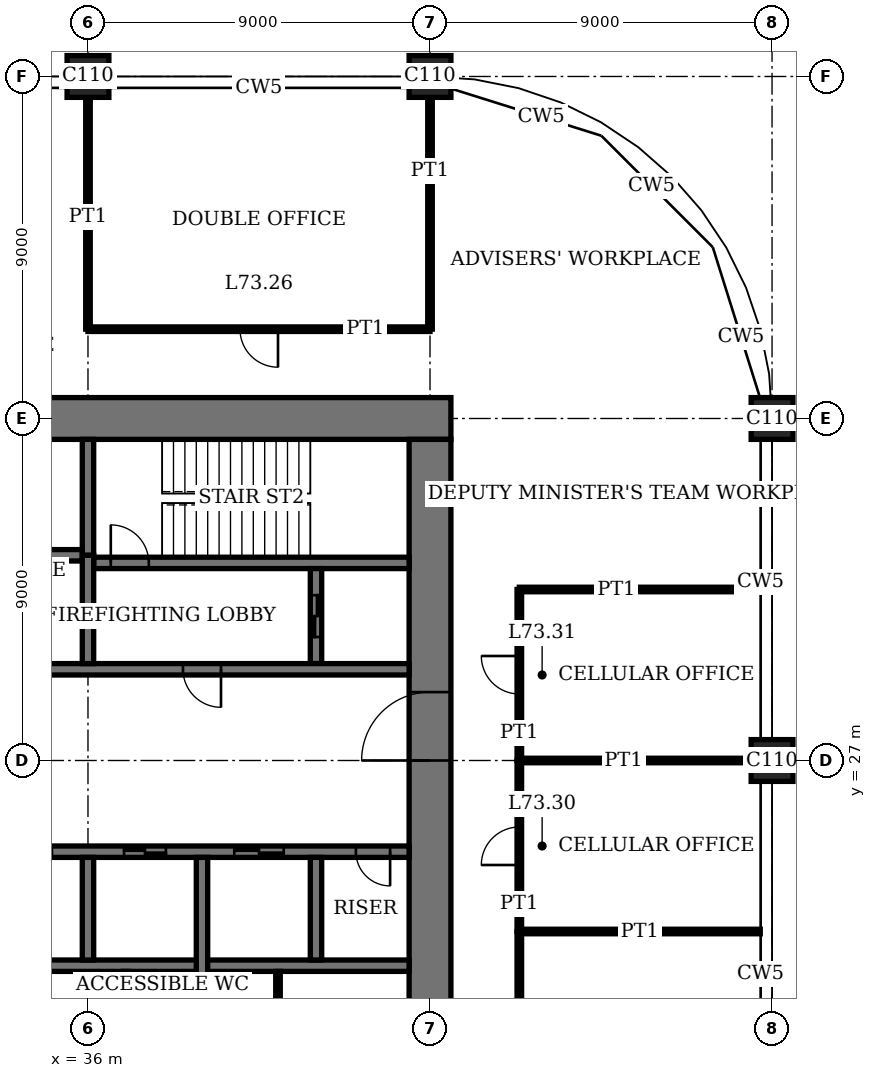
"""IFC4 building model, lengths in metres.
Left out: names, types, materials, properties, quantities, classifications, styles, units other than length and angle.
Written with IfcOpenShell. Run it as: python <this file> out.ifc"""

import sys

from ifc_helpers import new_model, si_unit, direction, frame, frame_2d, origin, origin_2d, place, context, subcontext, project, spatial, rectangle, extrude, element, fill, save


model = new_model("IFC4")
c1 = context("Model", 3, precision=1e-05, world=origin(), true_north=direction((0.0, 1.0)))
c2 = subcontext(c1, "Body", "Model", "MODEL_VIEW")
j1 = project(units=[si_unit("LENGTHUNIT", "METRE"), si_unit("PLANEANGLEUNIT", "RADIAN")], contexts=[c1])
p1 = place(None, origin())
s1 = spatial("IfcSite", under=j1, at=p1, CompositionType="ELEMENT")
p2 = place(p1, origin())
s2 = spatial("IfcBuilding", under=s1, at=p2, CompositionType="ELEMENT")
p3 = place(p2, frame((0.0, 0.0, 299.4)))
s3 = spatial("IfcBuildingStorey", under=s2, at=p3, CompositionType="ELEMENT", Elevation=299.4)
for number, where, z_axis, x_axis in (
    (1, (36.0, 45.0, 0.0), (0.0, 0.0, 1.0), (1.0, 0.0, 0.0)),
    (2, (45.0, 45.0, 0.0), (0.0, 0.0, 1.0), (1.0, 0.0, 0.0)),
    (3, (54.0, 27.0, 0.0), (0.0, 0.0, 1.0), (1.0, 0.0, 0.0)),
    (4, (54.0, 36.0, 0.0), (0.0, 0.0, 1.0), (1.0, 0.0, 0.0)),
):
    element("IfcColumn", number, at=place(p3, frame(where, z_axis=z_axis, x_axis=x_axis)), inside=s3, PredefinedType="COLUMN", context=c2, shape_type="SweptSolid", body=[
        extrude(rectangle(XDim=1.1, YDim=1.1, at=origin_2d()), origin(), (0.0, 0.0, 1.0), 4.0),
    ])
p4 = place(p3, frame((45.55, 36.0, 0.0), z_axis=(0.0, 0.0, 1.0), x_axis=(-1.0, 0.0, 0.0)))
e5 = element("IfcWall", 5, at=p4, inside=s3, PredefinedType="SHEAR", context=c2, shape_type="SweptSolid", body=[
    extrude(rectangle(XDim=28.1, YDim=1.1, at=frame_2d((14.05, 0.0))), origin(), (0.0, 0.0, 1.0), 4.0),
])
p5 = place(p4, frame((11.55, 0.0, 0.0)))
e6 = element("IfcOpeningElement", 6, at=p5, cuts=e5, PredefinedType="OPENING", context=c2, shape_type="SweptSolid", body=[
    extrude(rectangle(XDim=1.0, YDim=2.4, at=frame_2d((0.5, 1.2))), frame((0.0, 0.56, 0.0), z_axis=(0.0, -1.0, 0.0), x_axis=(1.0, 0.0, 0.0)), (0.0, 0.0, 1.0), 1.12),
])
p6 = place(p4, frame((16.55, 0.0, 0.0)))
e7 = element("IfcOpeningElement", 7, at=p6, cuts=e5, PredefinedType="OPENING", context=c2, shape_type="SweptSolid", body=[
    extrude(rectangle(XDim=1.0, YDim=2.4, at=frame_2d((0.5, 1.2))), frame((0.0, 0.56, 0.0), z_axis=(0.0, -1.0, 0.0), x_axis=(1.0, 0.0, 0.0)), (0.0, 0.0, 1.0), 1.12),
])
p7 = place(p4, frame((20.0, 0.0, 0.0)))
e8 = element("IfcOpeningElement", 8, at=p7, cuts=e5, PredefinedType="OPENING", context=c2, shape_type="SweptSolid", body=[
    extrude(rectangle(XDim=1.1, YDim=2.4, at=frame_2d((0.55, 1.2))), frame((0.0, 0.56, 0.0), z_axis=(0.0, -1.0, 0.0), x_axis=(1.0, 0.0, 0.0)), (0.0, 0.0, 1.0), 1.12),
])
p8 = place(p4, frame((24.05, 0.0, 0.0)))
e9 = element("IfcOpeningElement", 9, at=p8, cuts=e5, PredefinedType="OPENING", context=c2, shape_type="SweptSolid", body=[
    extrude(rectangle(XDim=1.0, YDim=2.4, at=frame_2d((0.5, 1.2))), frame((0.0, 0.56, 0.0), z_axis=(0.0, -1.0, 0.0), x_axis=(1.0, 0.0, 0.0)), (0.0, 0.0, 1.0), 1.12),
])
p9 = place(p3, frame((45.0, 18.55, 0.0), z_axis=(0.0, 0.0, 1.0), x_axis=(0.0, 1.0, 0.0)))
e10 = element("IfcWall", 10, at=p9, inside=s3, PredefinedType="SHEAR", context=c2, shape_type="SweptSolid", body=[
    extrude(rectangle(XDim=16.9, YDim=1.1, at=frame_2d((8.45, 0.0))), origin(), (0.0, 0.0, 1.0), 4.0),
])
p10 = place(p9, frame((8.45, 0.0, 0.0)))
e11 = element("IfcOpeningElement", 11, at=p10, cuts=e10, PredefinedType="OPENING", context=c2, shape_type="SweptSolid", body=[
    extrude(rectangle(XDim=1.8, YDim=2.4, at=frame_2d((0.9, 1.2))), frame((0.0, 0.56, 0.0), z_axis=(0.0, -1.0, 0.0), x_axis=(1.0, 0.0, 0.0)), (0.0, 0.0, 1.0), 1.12),
])
p11 = place(p3, frame((36.15, 32.2, 0.0), z_axis=(0.0, 0.0, 1.0), x_axis=(1.0, 0.0, 0.0)))
e12 = element("IfcWall", 12, at=p11, inside=s3, PredefinedType="SHEAR", context=c2, shape_type="SweptSolid", body=[
    extrude(rectangle(XDim=8.3, YDim=0.3, at=frame_2d((4.15, 0.0))), origin(), (0.0, 0.0, 1.0), 4.0),
])
p12 = place(p11, frame((0.45, 0.0, 0.0)))
e13 = element("IfcOpeningElement", 13, at=p12, cuts=e12, PredefinedType="OPENING", context=c2, shape_type="SweptSolid", body=[
    extrude(rectangle(XDim=1.0, YDim=2.4, at=frame_2d((0.5, 1.2))), frame((0.0, 0.16, 0.0), z_axis=(0.0, -1.0, 0.0), x_axis=(1.0, 0.0, 0.0)), (0.0, 0.0, 1.0), 0.32),
])
p13 = place(p3, frame((36.0, 32.4, 0.0), z_axis=(0.0, 0.0, 1.0), x_axis=(0.0, 1.0, 0.0)))
e14 = element("IfcWall", 14, at=p13, inside=s3, PredefinedType="SHEAR", context=c2, shape_type="SweptSolid", body=[
    extrude(rectangle(XDim=3.05, YDim=0.3, at=frame_2d((1.525, 0.0))), origin(), (0.0, 0.0, 1.0), 4.0),
])
p14 = place(p3, frame((42.0, 29.55, 0.0), z_axis=(0.0, 0.0, 1.0), x_axis=(0.0, 1.0, 0.0)))
e15 = element("IfcWall", 15, at=p14, inside=s3, PredefinedType="SHEAR", context=c2, shape_type="SweptSolid", body=[
    extrude(rectangle(XDim=2.5, YDim=0.3, at=frame_2d((1.25, 0.0))), origin(), (0.0, 0.0, 1.0), 4.0),
])
p15 = place(p14, frame((0.7, 0.0, 0.0)))
e16 = element("IfcOpeningElement", 16, at=p15, cuts=e15, PredefinedType="OPENING", context=c2, shape_type="SweptSolid", body=[
    extrude(rectangle(XDim=1.1, YDim=2.4, at=frame_2d((0.55, 1.2))), frame((0.0, 0.16, 0.0), z_axis=(0.0, -1.0, 0.0), x_axis=(1.0, 0.0, 0.0)), (0.0, 0.0, 1.0), 0.32),
])
p16 = place(p3, frame((18.55, 24.6, 0.0), z_axis=(0.0, 0.0, 1.0), x_axis=(1.0, 0.0, 0.0)))
e17 = element("IfcWall", 17, at=p16, inside=s3, PredefinedType="SHEAR", context=c2, shape_type="SweptSolid", body=[
    extrude(rectangle(XDim=25.9, YDim=0.3, at=frame_2d((12.95, 0.0))), origin(), (0.0, 0.0, 1.0), 4.0),
])
p17 = place(p16, frame((4.95, 0.0, 0.0)))
e18 = element("IfcOpeningElement", 18, at=p17, cuts=e17, PredefinedType="OPENING", context=c2, shape_type="SweptSolid", body=[
    extrude(rectangle(XDim=1.0, YDim=2.4, at=frame_2d((0.5, 1.2))), frame((0.0, 0.16, 0.0), z_axis=(0.0, -1.0, 0.0), x_axis=(1.0, 0.0, 0.0)), (0.0, 0.0, 1.0), 0.32),
])
p18 = place(p16, frame((24.5, 0.0, 0.0)))
e19 = element("IfcOpeningElement", 19, at=p18, cuts=e17, PredefinedType="OPENING", context=c2, shape_type="SweptSolid", body=[
    extrude(rectangle(XDim=0.9, YDim=2.1, at=frame_2d((0.45, 1.05))), frame((0.0, 0.16, 0.0), z_axis=(0.0, -1.0, 0.0), x_axis=(1.0, 0.0, 0.0)), (0.0, 0.0, 1.0), 0.32),
])
p19 = place(p16, frame((9.4, 0.0, 0.0)))
e20 = element("IfcOpeningElement", 20, at=p19, cuts=e17, PredefinedType="OPENING", context=c2, shape_type="SweptSolid", body=[
    extrude(rectangle(XDim=1.1, YDim=2.4, at=frame_2d((0.55, 1.2))), frame((0.0, 0.16, 0.0), z_axis=(0.0, -1.0, 0.0), x_axis=(1.0, 0.0, 0.0)), (0.0, 0.0, 1.0), 0.32),
])
p20 = place(p16, frame((12.4, 0.0, 0.0)))
e21 = element("IfcOpeningElement", 21, at=p20, cuts=e17, PredefinedType="OPENING", context=c2, shape_type="SweptSolid", body=[
    extrude(rectangle(XDim=1.1, YDim=2.4, at=frame_2d((0.55, 1.2))), frame((0.0, 0.16, 0.0), z_axis=(0.0, -1.0, 0.0), x_axis=(1.0, 0.0, 0.0)), (0.0, 0.0, 1.0), 0.32),
])
p21 = place(p16, frame((15.4, 0.0, 0.0)))
e22 = element("IfcOpeningElement", 22, at=p21, cuts=e17, PredefinedType="OPENING", context=c2, shape_type="SweptSolid", body=[
    extrude(rectangle(XDim=1.1, YDim=2.4, at=frame_2d((0.55, 1.2))), frame((0.0, 0.16, 0.0), z_axis=(0.0, -1.0, 0.0), x_axis=(1.0, 0.0, 0.0)), (0.0, 0.0, 1.0), 0.32),
])
p22 = place(p16, frame((18.4, 0.0, 0.0)))
e23 = element("IfcOpeningElement", 23, at=p22, cuts=e17, PredefinedType="OPENING", context=c2, shape_type="SweptSolid", body=[
    extrude(rectangle(XDim=1.1, YDim=2.4, at=frame_2d((0.55, 1.2))), frame((0.0, 0.16, 0.0), z_axis=(0.0, -1.0, 0.0), x_axis=(1.0, 0.0, 0.0)), (0.0, 0.0, 1.0), 0.32),
])
p23 = place(p16, frame((21.3, 0.0, 0.0)))
e24 = element("IfcOpeningElement", 24, at=p23, cuts=e17, PredefinedType="OPENING", context=c2, shape_type="SweptSolid", body=[
    extrude(rectangle(XDim=1.3, YDim=2.4, at=frame_2d((0.65, 1.2))), frame((0.0, 0.16, 0.0), z_axis=(0.0, -1.0, 0.0), x_axis=(1.0, 0.0, 0.0)), (0.0, 0.0, 1.0), 0.32),
])
p24 = place(p3, frame((18.55, 29.4, 0.0), z_axis=(0.0, 0.0, 1.0), x_axis=(1.0, 0.0, 0.0)))
e25 = element("IfcWall", 25, at=p24, inside=s3, PredefinedType="SHEAR", context=c2, shape_type="SweptSolid", body=[
    extrude(rectangle(XDim=25.9, YDim=0.3, at=frame_2d((12.95, 0.0))), origin(), (0.0, 0.0, 1.0), 4.0),
])
p25 = place(p24, frame((19.95, 0.0, 0.0)))
e26 = element("IfcOpeningElement", 26, at=p25, cuts=e25, PredefinedType="OPENING", context=c2, shape_type="SweptSolid", body=[
    extrude(rectangle(XDim=1.0, YDim=2.4, at=frame_2d((0.5, 1.2))), frame((0.0, 0.16, 0.0), z_axis=(0.0, -1.0, 0.0), x_axis=(1.0, 0.0, 0.0)), (0.0, 0.0, 1.0), 0.32),
])
p26 = place(p24, frame((0.5, 0.0, 0.0)))
e27 = element("IfcOpeningElement", 27, at=p26, cuts=e25, PredefinedType="OPENING", context=c2, shape_type="SweptSolid", body=[
    extrude(rectangle(XDim=0.9, YDim=2.1, at=frame_2d((0.45, 1.05))), frame((0.0, 0.16, 0.0), z_axis=(0.0, -1.0, 0.0), x_axis=(1.0, 0.0, 0.0)), (0.0, 0.0, 1.0), 0.32),
])
p27 = place(p24, frame((15.45, 0.0, 0.0)))
e28 = element("IfcOpeningElement", 28, at=p27, cuts=e25, PredefinedType="OPENING", context=c2, shape_type="SweptSolid", body=[
    extrude(rectangle(XDim=1.0, YDim=2.4, at=frame_2d((0.5, 1.2))), frame((0.0, 0.16, 0.0), z_axis=(0.0, -1.0, 0.0), x_axis=(1.0, 0.0, 0.0)), (0.0, 0.0, 1.0), 0.32),
])
p28 = place(p24, frame((12.45, 0.0, 0.0)))
e29 = element("IfcOpeningElement", 29, at=p28, cuts=e25, PredefinedType="OPENING", context=c2, shape_type="SweptSolid", body=[
    extrude(rectangle(XDim=1.0, YDim=2.4, at=frame_2d((0.5, 1.2))), frame((0.0, 0.16, 0.0), z_axis=(0.0, -1.0, 0.0), x_axis=(1.0, 0.0, 0.0)), (0.0, 0.0, 1.0), 0.32),
])
p29 = place(p24, frame((9.45, 0.0, 0.0)))
e30 = element("IfcOpeningElement", 30, at=p29, cuts=e25, PredefinedType="OPENING", context=c2, shape_type="SweptSolid", body=[
    extrude(rectangle(XDim=1.0, YDim=2.4, at=frame_2d((0.5, 1.2))), frame((0.0, 0.16, 0.0), z_axis=(0.0, -1.0, 0.0), x_axis=(1.0, 0.0, 0.0)), (0.0, 0.0, 1.0), 0.32),
])
p30 = place(p24, frame((6.45, 0.0, 0.0)))
e31 = element("IfcOpeningElement", 31, at=p30, cuts=e25, PredefinedType="OPENING", context=c2, shape_type="SweptSolid", body=[
    extrude(rectangle(XDim=1.0, YDim=2.4, at=frame_2d((0.5, 1.2))), frame((0.0, 0.16, 0.0), z_axis=(0.0, -1.0, 0.0), x_axis=(1.0, 0.0, 0.0)), (0.0, 0.0, 1.0), 0.32),
])
p31 = place(p24, frame((3.3, 0.0, 0.0)))
e32 = element("IfcOpeningElement", 32, at=p31, cuts=e25, PredefinedType="OPENING", context=c2, shape_type="SweptSolid", body=[
    extrude(rectangle(XDim=1.3, YDim=2.4, at=frame_2d((0.65, 1.2))), frame((0.0, 0.16, 0.0), z_axis=(0.0, -1.0, 0.0), x_axis=(1.0, 0.0, 0.0)), (0.0, 0.0, 1.0), 0.32),
])
for number, where, z_axis, x_axis in (
    (33, (27.15, 21.6, 0.0), (0.0, 0.0, 1.0), (1.0, 0.0, 0.0)),
    (34, (18.55, 32.4, 0.0), (0.0, 0.0, 1.0), (1.0, 0.0, 0.0)),
):
    element("IfcWall", number, at=place(p3, frame(where, z_axis=z_axis, x_axis=x_axis)), inside=s3, PredefinedType="SHEAR", context=c2, shape_type="SweptSolid", body=[
        extrude(rectangle(XDim=17.3, YDim=0.3, at=frame_2d((8.65, 0.0))), origin(), (0.0, 0.0, 1.0), 4.0),
    ])
p32 = place(p3, frame((36.0, 21.75, 0.0), z_axis=(0.0, 0.0, 1.0), x_axis=(0.0, 1.0, 0.0)))
e35 = element("IfcWall", 35, at=p32, inside=s3, PredefinedType="SHEAR", context=c2, shape_type="SweptSolid", body=[
    extrude(rectangle(XDim=2.7, YDim=0.3, at=frame_2d((1.35, 0.0))), origin(), (0.0, 0.0, 1.0), 4.0),
])
p33 = place(p3, frame((39.0, 18.55, 0.0), z_axis=(0.0, 0.0, 1.0), x_axis=(0.0, 1.0, 0.0)))
e36 = element("IfcWall", 36, at=p33, inside=s3, PredefinedType="SHEAR", context=c2, shape_type="SweptSolid", body=[
    extrude(rectangle(XDim=5.9, YDim=0.3, at=frame_2d((2.95, 0.0))), origin(), (0.0, 0.0, 1.0), 4.0),
])
p34 = place(p3, frame((42.0, 21.75, 0.0), z_axis=(0.0, 0.0, 1.0), x_axis=(0.0, 1.0, 0.0)))
e37 = element("IfcWall", 37, at=p34, inside=s3, PredefinedType="SHEAR", context=c2, shape_type="SweptSolid", body=[
    extrude(rectangle(XDim=2.7, YDim=0.3, at=frame_2d((1.35, 0.0))), origin(), (0.0, 0.0, 1.0), 4.0),
])
p35 = place(p3, frame((36.0, 29.55, 0.0), z_axis=(0.0, 0.0, 1.0), x_axis=(0.0, 1.0, 0.0)))
e38 = element("IfcWall", 38, at=p35, inside=s3, PredefinedType="SHEAR", context=c2, shape_type="SweptSolid", body=[
    extrude(rectangle(XDim=2.85, YDim=0.3, at=frame_2d((1.425, 0.0))), origin(), (0.0, 0.0, 1.0), 4.0),
])
p36 = place(p3, frame((47.35, 22.5, 0.0), z_axis=(0.0, 0.0, 1.0), x_axis=(1.0, 0.0, 0.0)))
e39 = element("IfcWall", 39, at=p36, inside=s3, PredefinedType="PARTITIONING", context=c2, shape_type="SweptSolid", body=[
    extrude(rectangle(XDim=6.34, YDim=0.12, at=frame_2d((3.17, 0.0))), origin(), (0.0, 0.0, 1.0), 3.1),
])
p37 = place(p3, frame((47.35, 27.0, 0.0), z_axis=(0.0, 0.0, 1.0), x_axis=(1.0, 0.0, 0.0)))
e40 = element("IfcWall", 40, at=p37, inside=s3, PredefinedType="PARTITIONING", context=c2, shape_type="SweptSolid", body=[
    extrude(rectangle(XDim=6.1, YDim=0.12, at=frame_2d((3.05, 0.0))), origin(), (0.0, 0.0, 1.0), 3.05),
])
p38 = place(p3, frame((47.35, 31.5, 0.0), z_axis=(0.0, 0.0, 1.0), x_axis=(1.0, 0.0, 0.0)))
e41 = element("IfcWall", 41, at=p38, inside=s3, PredefinedType="PARTITIONING", context=c2, shape_type="SweptSolid", body=[
    extrude(rectangle(XDim=6.34, YDim=0.12, at=frame_2d((3.17, 0.0))), origin(), (0.0, 0.0, 1.0), 3.1),
])
p39 = place(p3, frame((36.0, 38.35, 0.0), z_axis=(0.0, 0.0, 1.0), x_axis=(1.0, 0.0, 0.0)))
e42 = element("IfcWall", 42, at=p39, inside=s3, PredefinedType="PARTITIONING", context=c2, shape_type="SweptSolid", body=[
    extrude(rectangle(XDim=9.0, YDim=0.12, at=frame_2d((4.5, 0.0))), origin(), (0.0, 0.0, 1.0), 3.75),
])
p40 = place(p39, frame((4.0, 0.0, 0.0)))
e43 = element("IfcOpeningElement", 43, at=p40, cuts=e42, PredefinedType="OPENING", context=c2, shape_type="SweptSolid", body=[
    extrude(rectangle(XDim=1.0, YDim=2.4, at=frame_2d((0.5, 1.2))), frame((0.0, 0.07, 0.0), z_axis=(0.0, -1.0, 0.0), x_axis=(1.0, 0.0, 0.0)), (0.0, 0.0, 1.0), 0.14),
])
for number, where, z_axis, x_axis in (
    (44, (36.0, 38.35, 0.0), (0.0, 0.0, 1.0), (0.0, 1.0, 0.0)),
    (45, (45.0, 38.35, 0.0), (0.0, 0.0, 1.0), (0.0, 1.0, 0.0)),
):
    element("IfcWall", number, at=place(p3, frame(where, z_axis=z_axis, x_axis=x_axis)), inside=s3, PredefinedType="PARTITIONING", context=c2, shape_type="SweptSolid", body=[
        extrude(rectangle(XDim=6.1, YDim=0.12, at=frame_2d((3.05, 0.0))), origin(), (0.0, 0.0, 1.0), 3.05),
    ])
p41 = place(p3, frame((47.35, 13.5, 0.0), z_axis=(0.0, 0.0, 1.0), x_axis=(0.0, 1.0, 0.0)))
e46 = element("IfcWall", 46, at=p41, inside=s3, PredefinedType="PARTITIONING", context=c2, shape_type="SweptSolid", body=[
    extrude(rectangle(XDim=9.0, YDim=0.12, at=frame_2d((4.5, 0.0))), origin(), (0.0, 0.0, 1.0), 3.75),
])
p42 = place(p3, frame((47.35, 22.5, 0.0), z_axis=(0.0, 0.0, 1.0), x_axis=(0.0, 1.0, 0.0)))
e47 = element("IfcWall", 47, at=p42, inside=s3, PredefinedType="PARTITIONING", context=c2, shape_type="SweptSolid", body=[
    extrude(rectangle(XDim=4.5, YDim=0.12, at=frame_2d((2.25, 0.0))), origin(), (0.0, 0.0, 1.0), 3.75),
])
p43 = place(p42, frame((1.75, 0.0, 0.0)))
e48 = element("IfcOpeningElement", 48, at=p43, cuts=e47, PredefinedType="OPENING", context=c2, shape_type="SweptSolid", body=[
    extrude(rectangle(XDim=1.0, YDim=2.4, at=frame_2d((0.5, 1.2))), frame((0.0, 0.07, 0.0), z_axis=(0.0, -1.0, 0.0), x_axis=(1.0, 0.0, 0.0)), (0.0, 0.0, 1.0), 0.14),
])
p44 = place(p3, frame((47.35, 27.0, 0.0), z_axis=(0.0, 0.0, 1.0), x_axis=(0.0, 1.0, 0.0)))
e49 = element("IfcWall", 49, at=p44, inside=s3, PredefinedType="PARTITIONING", context=c2, shape_type="SweptSolid", body=[
    extrude(rectangle(XDim=4.5, YDim=0.12, at=frame_2d((2.25, 0.0))), origin(), (0.0, 0.0, 1.0), 3.75),
])
p45 = place(p44, frame((1.75, 0.0, 0.0)))
e50 = element("IfcOpeningElement", 50, at=p45, cuts=e49, PredefinedType="OPENING", context=c2, shape_type="SweptSolid", body=[
    extrude(rectangle(XDim=1.0, YDim=2.4, at=frame_2d((0.5, 1.2))), frame((0.0, 0.07, 0.0), z_axis=(0.0, -1.0, 0.0), x_axis=(1.0, 0.0, 0.0)), (0.0, 0.0, 1.0), 0.14),
])
p46 = place(p3, frame((37.0, 18.55, 0.0), z_axis=(0.0, 0.0, 1.0), x_axis=(0.0, 1.0, 0.0)))
e51 = element("IfcWall", 51, at=p46, inside=s3, PredefinedType="PARTITIONING", context=c2, shape_type="SweptSolid", body=[
    extrude(rectangle(XDim=2.9, YDim=0.15, at=frame_2d((1.45, 0.0))), origin(), (0.0, 0.0, 1.0), 3.75),
])
p47 = place(p3, frame((41.0, 18.55, 0.0), z_axis=(0.0, 0.0, 1.0), x_axis=(0.0, 1.0, 0.0)))
e52 = element("IfcWall", 52, at=p47, inside=s3, PredefinedType="PARTITIONING", context=c2, shape_type="SweptSolid", body=[
    extrude(rectangle(XDim=2.9, YDim=0.12, at=frame_2d((1.45, 0.0))), origin(), (0.0, 0.0, 1.0), 3.75),
])
p48 = place(p47, frame((0.95, 0.0, 0.0)))
e53 = element("IfcOpeningElement", 53, at=p48, cuts=e52, PredefinedType="OPENING", context=c2, shape_type="SweptSolid", body=[
    extrude(rectangle(XDim=1.0, YDim=2.4, at=frame_2d((0.5, 1.2))), frame((0.0, 0.07, 0.0), z_axis=(0.0, -1.0, 0.0), x_axis=(1.0, 0.0, 0.0)), (0.0, 0.0, 1.0), 0.14),
])
p49 = place(p10, origin())
e54 = element("IfcDoor", 54, at=p49, inside=s3, OperationType="DOUBLE_DOOR_DOUBLE_SWING", PredefinedType="DOOR", context=c2, shape_type="SweptSolid", body=[
    extrude(rectangle(XDim=1.8, YDim=2.4, at=frame_2d((0.9, 1.2))), frame((0.0, 0.03, 0.0), z_axis=(0.0, -1.0, 0.0), x_axis=(1.0, 0.0, 0.0)), (0.0, 0.0, 1.0), 0.06),
    extrude(rectangle(XDim=0.04, YDim=2.4, at=frame_2d((0.02, 1.2))), frame((0.0, 0.55, 0.0), z_axis=(0.0, -1.0, 0.0), x_axis=(1.0, 0.0, 0.0)), (0.0, 0.0, 1.0), 1.1),
    extrude(rectangle(XDim=0.04, YDim=2.4, at=frame_2d((1.78, 1.2))), frame((0.0, 0.55, 0.0), z_axis=(0.0, -1.0, 0.0), x_axis=(1.0, 0.0, 0.0)), (0.0, 0.0, 1.0), 1.1),
    extrude(rectangle(XDim=1.8, YDim=0.04, at=frame_2d((0.9, 2.38))), frame((0.0, 0.55, 0.0), z_axis=(0.0, -1.0, 0.0), x_axis=(1.0, 0.0, 0.0)), (0.0, 0.0, 1.0), 1.1),
])
fill(e11, e54)
p50 = place(p12, origin())
e55 = element("IfcDoor", 55, at=p50, inside=s3, OperationType="SINGLE_SWING_RIGHT", PredefinedType="DOOR", context=c2, shape_type="SweptSolid", body=[
    extrude(rectangle(XDim=1.0, YDim=2.4, at=frame_2d((0.5, 1.2))), frame((0.0, 0.03, 0.0), z_axis=(0.0, -1.0, 0.0), x_axis=(1.0, 0.0, 0.0)), (0.0, 0.0, 1.0), 0.06),
])
fill(e13, e55)
p51 = place(p25, origin())
e56 = element("IfcDoor", 56, at=p51, inside=s3, OperationType="SINGLE_SWING_RIGHT", PredefinedType="DOOR", context=c2, shape_type="SweptSolid", body=[
    extrude(rectangle(XDim=1.0, YDim=2.4, at=frame_2d((0.5, 1.2))), frame((0.0, 0.03, 0.0), z_axis=(0.0, -1.0, 0.0), x_axis=(1.0, 0.0, 0.0)), (0.0, 0.0, 1.0), 0.06),
])
fill(e26, e56)
p52 = place(p18, origin())
e57 = element("IfcDoor", 57, at=p52, inside=s3, OperationType="SINGLE_SWING_RIGHT", PredefinedType="DOOR", context=c2, shape_type="SweptSolid", body=[
    extrude(rectangle(XDim=0.9, YDim=2.1, at=frame_2d((0.45, 1.05))), frame((0.0, 0.03, 0.0), z_axis=(0.0, -1.0, 0.0), x_axis=(1.0, 0.0, 0.0)), (0.0, 0.0, 1.0), 0.06),
])
fill(e19, e57)
p53 = place(p40, origin())
e58 = element("IfcDoor", 58, at=p53, inside=s3, OperationType="SINGLE_SWING_RIGHT", PredefinedType="DOOR", context=c2, shape_type="SweptSolid", body=[
    extrude(rectangle(XDim=1.0, YDim=2.4, at=frame_2d((0.5, 1.2))), frame((0.0, 0.025, 0.0), z_axis=(0.0, -1.0, 0.0), x_axis=(1.0, 0.0, 0.0)), (0.0, 0.0, 1.0), 0.05),
])
fill(e43, e58)
p54 = place(p43, origin())
e59 = element("IfcDoor", 59, at=p54, inside=s3, OperationType="SINGLE_SWING_RIGHT", PredefinedType="DOOR", context=c2, shape_type="SweptSolid", body=[
    extrude(rectangle(XDim=1.0, YDim=2.4, at=frame_2d((0.5, 1.2))), frame((0.0, 0.025, 0.0), z_axis=(0.0, -1.0, 0.0), x_axis=(1.0, 0.0, 0.0)), (0.0, 0.0, 1.0), 0.05),
])
fill(e48, e59)
p55 = place(p45, origin())
e60 = element("IfcDoor", 60, at=p55, inside=s3, OperationType="SINGLE_SWING_LEFT", PredefinedType="DOOR", context=c2, shape_type="SweptSolid", body=[
    extrude(rectangle(XDim=1.0, YDim=2.4, at=frame_2d((0.5, 1.2))), frame((0.0, 0.025, 0.0), z_axis=(0.0, -1.0, 0.0), x_axis=(1.0, 0.0, 0.0)), (0.0, 0.0, 1.0), 0.05),
])
fill(e50, e60)
p56 = place(p22, origin())
e61 = element("IfcDoor", 61, at=p56, inside=s3, OperationType="DOUBLE_DOOR_SLIDING", PredefinedType="DOOR", context=c2, shape_type="SweptSolid", body=[
    extrude(rectangle(XDim=1.1, YDim=2.4, at=frame_2d((0.55, 1.2))), frame((0.0, 0.02, 0.0), z_axis=(0.0, -1.0, 0.0), x_axis=(1.0, 0.0, 0.0)), (0.0, 0.0, 1.0), 0.04),
])
fill(e23, e61)
p57 = place(p23, origin())
e62 = element("IfcDoor", 62, at=p57, inside=s3, OperationType="DOUBLE_DOOR_SLIDING", PredefinedType="DOOR", context=c2, shape_type="SweptSolid", body=[
    extrude(rectangle(XDim=1.3, YDim=2.4, at=frame_2d((0.65, 1.2))), frame((0.0, 0.02, 0.0), z_axis=(0.0, -1.0, 0.0), x_axis=(1.0, 0.0, 0.0)), (0.0, 0.0, 1.0), 0.04),
])
fill(e24, e62)
p58 = place(p15, origin())
e63 = element("IfcDoor", 63, at=p58, inside=s3, OperationType="DOUBLE_DOOR_SLIDING", PredefinedType="DOOR", context=c2, shape_type="SweptSolid", body=[
    extrude(rectangle(XDim=1.1, YDim=2.4, at=frame_2d((0.55, 1.2))), frame((0.0, 0.03, 0.0), z_axis=(0.0, -1.0, 0.0), x_axis=(1.0, 0.0, 0.0)), (0.0, 0.0, 1.0), 0.06),
])
fill(e16, e63)
save(model, sys.argv[1])
